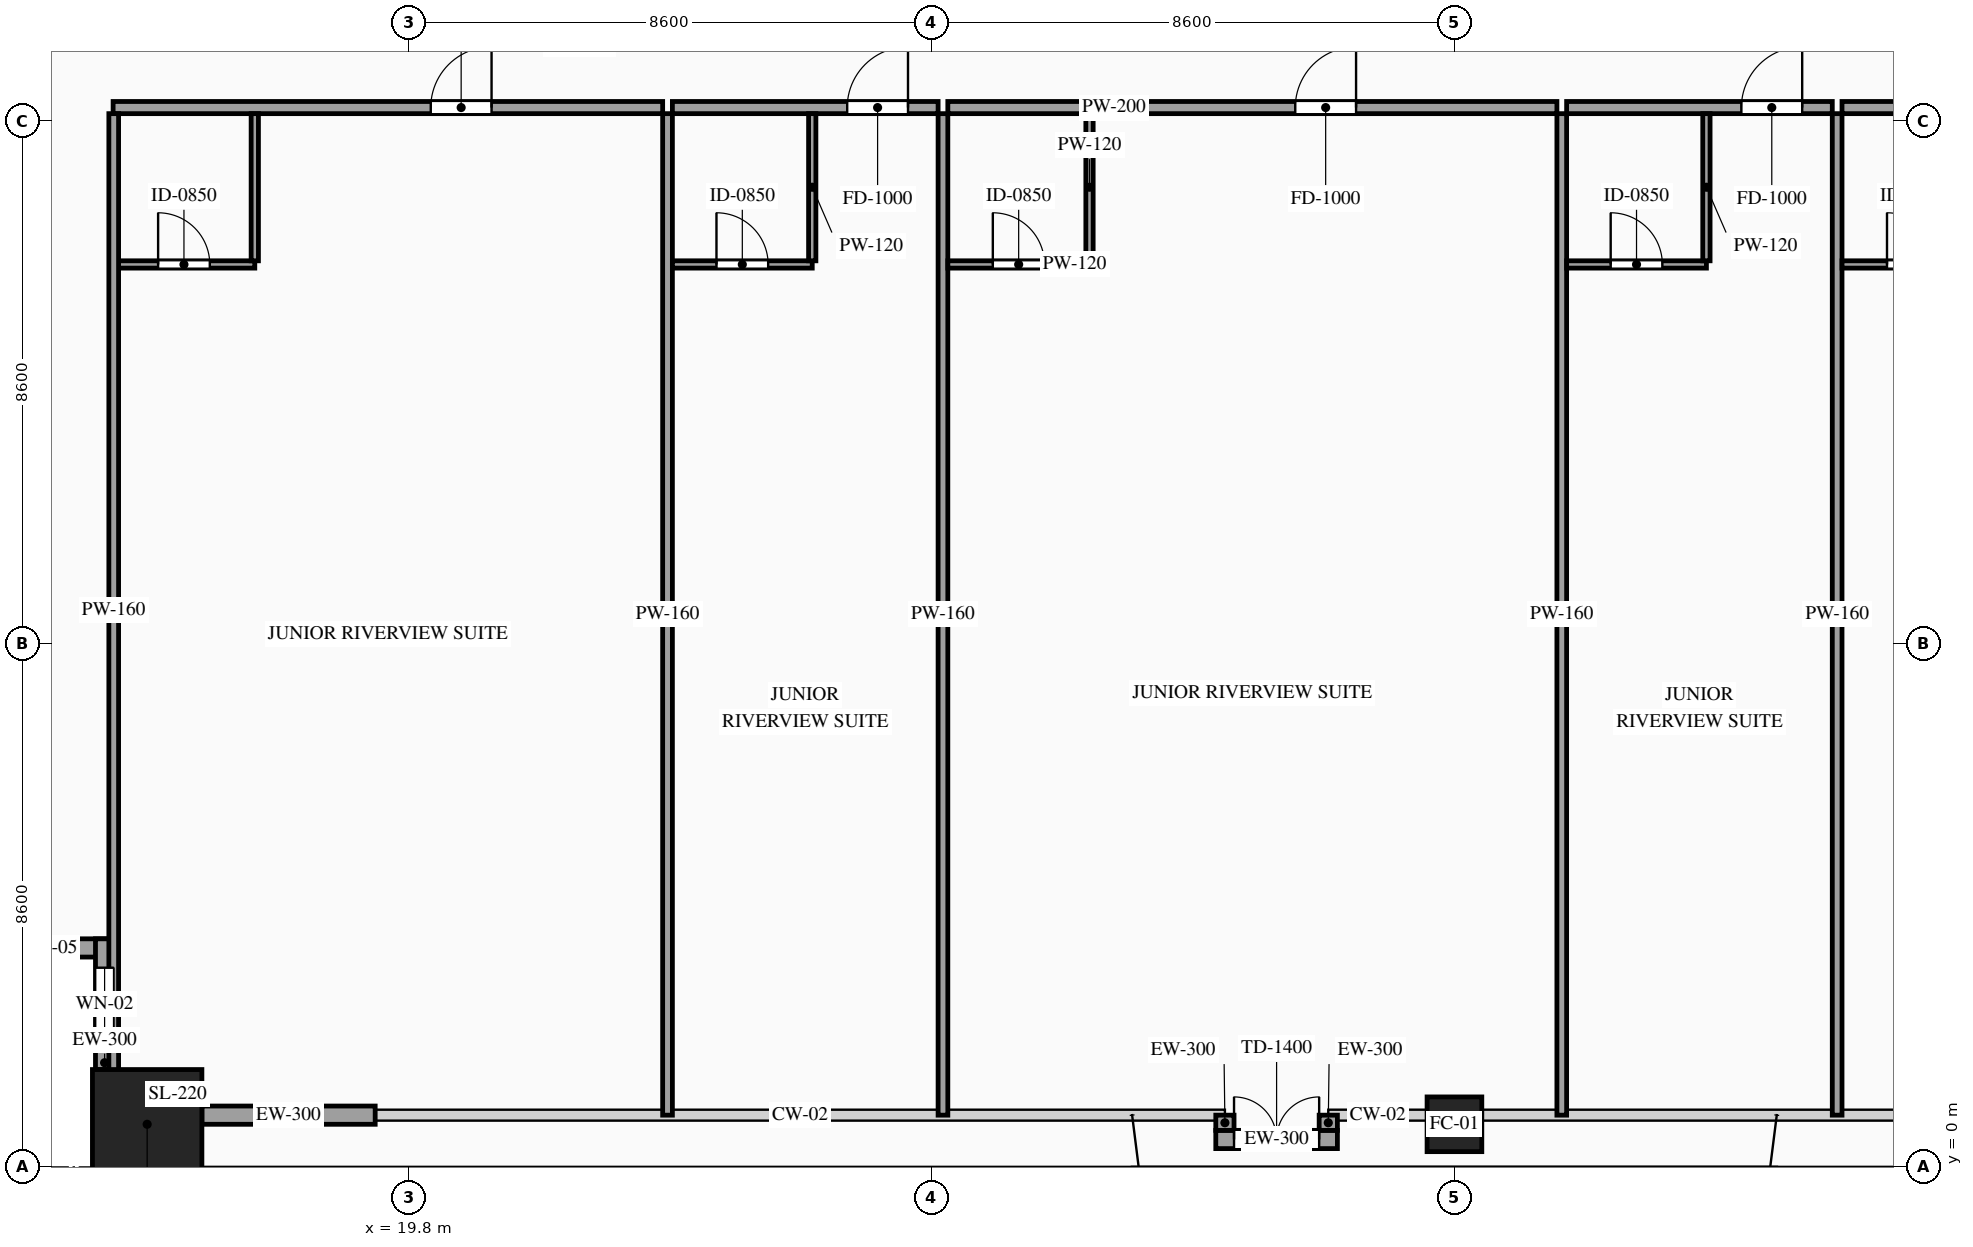
"""IFC4 building model, lengths in metres.
Left out: names, types, materials, properties, quantities, classifications, styles, units other than length and angle.
Written with IfcOpenShell. Run it as: python <this file> out.ifc"""

import sys

from ifc_helpers import new_model, si_unit, direction, frame, frame_2d, origin, origin_2d, place, context, subcontext, project, spatial, rectangle, hollow_rectangle, extrude, source, transform, mapped, element, fill, save


model = new_model("IFC4")
c1 = context("Model", 3, precision=1e-05, world=origin(), true_north=direction((0.0, 1.0)))
c2 = subcontext(c1, "Body", "Model", "MODEL_VIEW")
j1 = project(units=[si_unit("LENGTHUNIT", "METRE"), si_unit("PLANEANGLEUNIT", "RADIAN")], contexts=[c1])
p1 = place(None, origin())
s1 = spatial("IfcSite", under=j1, at=p1, CompositionType="ELEMENT")
p2 = place(p1, origin())
s2 = spatial("IfcBuilding", under=s1, at=p2, CompositionType="ELEMENT")
p3 = place(p2, frame((0.0, 0.0, 71.2)))
s3 = spatial("IfcBuildingStorey", under=s2, at=p3, CompositionType="ELEMENT", Elevation=71.2)
m1 = source(origin(), c2, "Body", "SweptSolid", [
    extrude(hollow_rectangle(XDim=1.8, YDim=1.8, WallThickness=0.08, at=origin_2d()), origin(), (0.0, 0.0, 1.0), 3.6),
])
p4 = place(p3, frame((15.5, 0.7, 0.0), z_axis=(0.0, 0.0, 1.0), x_axis=(1.0, 0.0, 0.0)))
e1 = element("IfcColumn", 1, at=p4, inside=s3, PredefinedType="COLUMN", context=c2, shape_type="MappedRepresentation", body=[
    mapped(m1, transform((0.0, 0.0, 0.0), scale=1.0)),
])
m2 = source(origin(), c2, "Body", "SweptSolid", [
    extrude(hollow_rectangle(XDim=0.9, YDim=0.9, WallThickness=0.042, at=origin_2d()), origin(), (0.0, 0.0, 1.0), 3.6),
])
p5 = place(p3, frame((37.0, 0.7, 0.0), z_axis=(0.0, 0.0, 1.0), x_axis=(1.0, 0.0, 0.0)))
e2 = element("IfcColumn", 2, at=p5, inside=s3, PredefinedType="COLUMN", context=c2, shape_type="MappedRepresentation", body=[
    mapped(m2, transform((0.0, 0.0, 0.0), scale=1.0)),
])
p6 = place(p3, frame((12.8, 3.6, 0.0), z_axis=(0.0, 0.0, 1.0), x_axis=(1.0, 0.0, 0.0)))
e3 = element("IfcWall", 3, at=p6, inside=s3, PredefinedType="SOLIDWALL", context=c2, shape_type="SweptSolid", body=[
    extrude(rectangle(XDim=2.15, YDim=0.3, at=frame_2d((1.075, 0.0))), origin(), (0.0, 0.0, 1.0), 3.38),
])
p7 = place(p6, frame((0.625, 0.0, 0.85)))
e4 = element("IfcOpeningElement", 4, at=p7, cuts=e3, PredefinedType="OPENING", context=c2, shape_type="SweptSolid", body=[
    extrude(rectangle(XDim=0.9, YDim=1.5, at=frame_2d((0.45, 0.75))), frame((0.0, 0.165, 0.0), z_axis=(0.0, -1.0, 0.0), x_axis=(1.0, 0.0, 0.0)), (0.0, 0.0, 1.0), 0.33),
])
p8 = place(p3, frame((14.8, 3.75, 0.0), z_axis=(0.0, 0.0, 1.0), x_axis=(0.0, -1.0, 0.0)))
e5 = element("IfcWall", 5, at=p8, inside=s3, PredefinedType="SOLIDWALL", context=c2, shape_type="SweptSolid", body=[
    extrude(rectangle(XDim=2.15, YDim=0.3, at=frame_2d((1.075, 0.0))), origin(), (0.0, 0.0, 1.0), 3.38),
])
p9 = place(p8, frame((0.475, 0.0, 0.85)))
e6 = element("IfcOpeningElement", 6, at=p9, cuts=e5, PredefinedType="OPENING", context=c2, shape_type="SweptSolid", body=[
    extrude(rectangle(XDim=1.2, YDim=2.1, at=frame_2d((0.6, 1.05))), frame((0.0, 0.165, 0.0), z_axis=(0.0, -1.0, 0.0), x_axis=(1.0, 0.0, 0.0)), (0.0, 0.0, 1.0), 0.33),
])
m3 = source(origin(), c2, "Body", "SweptSolid", [
    extrude(rectangle(XDim=2.85, YDim=0.3, at=frame_2d((1.425, 0.0))), origin(), (0.0, 0.0, 1.0), 2.775),
])
p10 = place(p3, frame((16.4, 0.85, 0.0), z_axis=(0.0, 0.0, 1.0), x_axis=(1.0, 0.0, 0.0)))
e7 = element("IfcWall", 7, at=p10, inside=s3, PredefinedType="SOLIDWALL", context=c2, shape_type="MappedRepresentation", body=[
    mapped(m3, transform((0.0, 0.0, 0.0), scale=1.0)),
])
p11 = place(p3, frame((33.075, 0.45, 0.0), z_axis=(0.0, 0.0, 1.0), x_axis=(1.0, 0.0, 0.0)))
e8 = element("IfcWall", 8, at=p11, inside=s3, PredefinedType="SOLIDWALL", context=c2, shape_type="SweptSolid", body=[
    extrude(rectangle(XDim=2.0, YDim=0.3, at=frame_2d((1.0, 0.0))), origin(), (0.0, 0.0, 1.0), 3.38),
])
p12 = place(p11, frame((0.3, 0.0, 0.0)))
e9 = element("IfcOpeningElement", 9, at=p12, cuts=e8, PredefinedType="OPENING", context=c2, shape_type="SweptSolid", body=[
    extrude(rectangle(XDim=1.4, YDim=2.3, at=frame_2d((0.7, 1.15))), frame((0.0, 0.165, 0.0), z_axis=(0.0, -1.0, 0.0), x_axis=(1.0, 0.0, 0.0)), (0.0, 0.0, 1.0), 0.33),
])
m4 = source(origin(), c2, "Body", "SweptSolid", [
    extrude(rectangle(XDim=0.25, YDim=0.3, at=frame_2d((0.125, 0.0))), origin(), (0.0, 0.0, 1.0), 3.38),
])
for number, where, z_axis, x_axis in (
    (10, (33.225, 0.85, 0.0), (0.0, 0.0, 1.0), (0.0, -1.0, 0.0)),
    (11, (34.925, 0.6, 0.0), (0.0, 0.0, 1.0), (0.0, 1.0, 0.0)),
):
    element("IfcWall", number, at=place(p3, frame(where, z_axis=z_axis, x_axis=x_axis)), inside=s3, PredefinedType="SOLIDWALL", context=c2, shape_type="MappedRepresentation", body=[
        mapped(m4, transform((0.0, 0.0, 0.0), scale=1.0)),
    ])
p13 = place(p3, frame((14.94, 17.42, 0.0), z_axis=(0.0, 0.0, 1.0), x_axis=(1.0, 0.0, 0.0)))
e12 = element("IfcWall", 12, at=p13, inside=s3, PredefinedType="PARTITIONING", context=c2, shape_type="SweptSolid", body=[
    extrude(rectangle(XDim=9.038, YDim=0.2, at=frame_2d((4.519, 0.0))), origin(), (0.0, 0.0, 1.0), 3.38),
])
p14 = place(p13, frame((5.224, 0.0, 0.0)))
e13 = element("IfcOpeningElement", 13, at=p14, cuts=e12, PredefinedType="OPENING", context=c2, shape_type="SweptSolid", body=[
    extrude(rectangle(XDim=1.0, YDim=2.2, at=frame_2d((0.5, 1.1))), frame((0.0, 0.115, 0.0), z_axis=(0.0, -1.0, 0.0), x_axis=(1.0, 0.0, 0.0)), (0.0, 0.0, 1.0), 0.23),
])
m5 = source(origin(), c2, "Body", "SweptSolid", [
    extrude(rectangle(XDim=16.47, YDim=0.16, at=frame_2d((8.235, 0.0))), origin(), (0.0, 0.0, 1.0), 3.38),
])
p15 = place(p3, frame((24.058, 0.85, 0.0), z_axis=(0.0, 0.0, 1.0), x_axis=(0.0, 1.0, 0.0)))
e14 = element("IfcWall", 14, at=p15, inside=s3, PredefinedType="PARTITIONING", context=c2, shape_type="MappedRepresentation", body=[
    mapped(m5, transform((0.0, 0.0, 0.0), scale=1.0)),
])
p16 = place(p3, frame((14.94, 14.84, 0.0), z_axis=(0.0, 0.0, 1.0), x_axis=(1.0, 0.0, 0.0)))
e15 = element("IfcWall", 15, at=p16, inside=s3, PredefinedType="PARTITIONING", context=c2, shape_type="SweptSolid", body=[
    extrude(rectangle(XDim=2.33, YDim=0.12, at=frame_2d((1.165, 0.0))), origin(), (0.0, 0.0, 1.0), 3.38),
])
p17 = place(p16, frame((0.74, 0.0, 0.0)))
e16 = element("IfcOpeningElement", 16, at=p17, cuts=e15, PredefinedType="OPENING", context=c2, shape_type="SweptSolid", body=[
    extrude(rectangle(XDim=0.85, YDim=2.1, at=frame_2d((0.425, 1.05))), frame((0.0, 0.075, 0.0), z_axis=(0.0, -1.0, 0.0), x_axis=(1.0, 0.0, 0.0)), (0.0, 0.0, 1.0), 0.15),
])
m6 = source(origin(), c2, "Body", "SweptSolid", [
    extrude(rectangle(XDim=2.42, YDim=0.12, at=frame_2d((1.21, 0.0))), origin(), (0.0, 0.0, 1.0), 3.38),
])
p18 = place(p3, frame((17.27, 14.9, 0.0), z_axis=(0.0, 0.0, 1.0), x_axis=(0.0, 1.0, 0.0)))
e17 = element("IfcWall", 17, at=p18, inside=s3, PredefinedType="PARTITIONING", context=c2, shape_type="MappedRepresentation", body=[
    mapped(m6, transform((0.0, 0.0, 0.0), scale=1.0)),
])
p19 = place(p3, frame((24.138, 17.42, 0.0), z_axis=(0.0, 0.0, 1.0), x_axis=(1.0, 0.0, 0.0)))
e18 = element("IfcWall", 18, at=p19, inside=s3, PredefinedType="PARTITIONING", context=c2, shape_type="SweptSolid", body=[
    extrude(rectangle(XDim=4.37, YDim=0.2, at=frame_2d((2.185, 0.0))), origin(), (0.0, 0.0, 1.0), 3.38),
])
p20 = place(p19, frame((2.875, 0.0, 0.0)))
e19 = element("IfcOpeningElement", 19, at=p20, cuts=e18, PredefinedType="OPENING", context=c2, shape_type="SweptSolid", body=[
    extrude(rectangle(XDim=1.0, YDim=2.2, at=frame_2d((0.5, 1.1))), frame((0.0, 0.115, 0.0), z_axis=(0.0, -1.0, 0.0), x_axis=(1.0, 0.0, 0.0)), (0.0, 0.0, 1.0), 0.23),
])
p21 = place(p3, frame((28.588, 0.85, 0.0), z_axis=(0.0, 0.0, 1.0), x_axis=(0.0, 1.0, 0.0)))
e20 = element("IfcWall", 20, at=p21, inside=s3, PredefinedType="PARTITIONING", context=c2, shape_type="MappedRepresentation", body=[
    mapped(m5, transform((0.0, 0.0, 0.0), scale=1.0)),
])
p22 = place(p3, frame((24.138, 14.84, 0.0), z_axis=(0.0, 0.0, 1.0), x_axis=(1.0, 0.0, 0.0)))
e21 = element("IfcWall", 21, at=p22, inside=s3, PredefinedType="PARTITIONING", context=c2, shape_type="SweptSolid", body=[
    extrude(rectangle(XDim=2.3, YDim=0.12, at=frame_2d((1.15, 0.0))), origin(), (0.0, 0.0, 1.0), 3.38),
])
p23 = place(p22, frame((0.725, 0.0, 0.0)))
e22 = element("IfcOpeningElement", 22, at=p23, cuts=e21, PredefinedType="OPENING", context=c2, shape_type="SweptSolid", body=[
    extrude(rectangle(XDim=0.85, YDim=2.1, at=frame_2d((0.425, 1.05))), frame((0.0, 0.075, 0.0), z_axis=(0.0, -1.0, 0.0), x_axis=(1.0, 0.0, 0.0)), (0.0, 0.0, 1.0), 0.15),
])
p24 = place(p3, frame((26.438, 14.9, 0.0), z_axis=(0.0, 0.0, 1.0), x_axis=(0.0, 1.0, 0.0)))
e23 = element("IfcWall", 23, at=p24, inside=s3, PredefinedType="PARTITIONING", context=c2, shape_type="MappedRepresentation", body=[
    mapped(m6, transform((0.0, 0.0, 0.0), scale=1.0)),
])
p25 = place(p3, frame((28.668, 17.42, 0.0), z_axis=(0.0, 0.0, 1.0), x_axis=(1.0, 0.0, 0.0)))
e24 = element("IfcWall", 24, at=p25, inside=s3, PredefinedType="PARTITIONING", context=c2, shape_type="SweptSolid", body=[
    extrude(rectangle(XDim=10.017, YDim=0.2, at=frame_2d((5.009, 0.0))), origin(), (0.0, 0.0, 1.0), 3.38),
])
p26 = place(p25, frame((5.714, 0.0, 0.0)))
e25 = element("IfcOpeningElement", 25, at=p26, cuts=e24, PredefinedType="OPENING", context=c2, shape_type="SweptSolid", body=[
    extrude(rectangle(XDim=1.0, YDim=2.2, at=frame_2d((0.5, 1.1))), frame((0.0, 0.115, 0.0), z_axis=(0.0, -1.0, 0.0), x_axis=(1.0, 0.0, 0.0)), (0.0, 0.0, 1.0), 0.23),
])
p27 = place(p3, frame((38.765, 0.85, 0.0), z_axis=(0.0, 0.0, 1.0), x_axis=(0.0, 1.0, 0.0)))
e26 = element("IfcWall", 26, at=p27, inside=s3, PredefinedType="PARTITIONING", context=c2, shape_type="MappedRepresentation", body=[
    mapped(m5, transform((0.0, 0.0, 0.0), scale=1.0)),
])
p28 = place(p3, frame((28.668, 14.84, 0.0), z_axis=(0.0, 0.0, 1.0), x_axis=(1.0, 0.0, 0.0)))
e27 = element("IfcWall", 27, at=p28, inside=s3, PredefinedType="PARTITIONING", context=c2, shape_type="SweptSolid", body=[
    extrude(rectangle(XDim=2.33, YDim=0.12, at=frame_2d((1.165, 0.0))), origin(), (0.0, 0.0, 1.0), 3.38),
])
p29 = place(p28, frame((0.74, 0.0, 0.0)))
e28 = element("IfcOpeningElement", 28, at=p29, cuts=e27, PredefinedType="OPENING", context=c2, shape_type="SweptSolid", body=[
    extrude(rectangle(XDim=0.85, YDim=2.1, at=frame_2d((0.425, 1.05))), frame((0.0, 0.075, 0.0), z_axis=(0.0, -1.0, 0.0), x_axis=(1.0, 0.0, 0.0)), (0.0, 0.0, 1.0), 0.15),
])
p30 = place(p3, frame((30.998, 14.9, 0.0), z_axis=(0.0, 0.0, 1.0), x_axis=(0.0, 1.0, 0.0)))
e29 = element("IfcWall", 29, at=p30, inside=s3, PredefinedType="PARTITIONING", context=c2, shape_type="MappedRepresentation", body=[
    mapped(m6, transform((0.0, 0.0, 0.0), scale=1.0)),
])
p31 = place(p3, frame((38.845, 17.42, 0.0), z_axis=(0.0, 0.0, 1.0), x_axis=(1.0, 0.0, 0.0)))
e30 = element("IfcWall", 30, at=p31, inside=s3, PredefinedType="PARTITIONING", context=c2, shape_type="SweptSolid", body=[
    extrude(rectangle(XDim=4.369, YDim=0.2, at=frame_2d((2.185, 0.0))), origin(), (0.0, 0.0, 1.0), 3.38),
])
p32 = place(p31, frame((2.874, 0.0, 0.0)))
e31 = element("IfcOpeningElement", 31, at=p32, cuts=e30, PredefinedType="OPENING", context=c2, shape_type="SweptSolid", body=[
    extrude(rectangle(XDim=1.0, YDim=2.2, at=frame_2d((0.5, 1.1))), frame((0.0, 0.115, 0.0), z_axis=(0.0, -1.0, 0.0), x_axis=(1.0, 0.0, 0.0)), (0.0, 0.0, 1.0), 0.23),
])
p33 = place(p3, frame((43.294, 0.85, 0.0), z_axis=(0.0, 0.0, 1.0), x_axis=(0.0, 1.0, 0.0)))
e32 = element("IfcWall", 32, at=p33, inside=s3, PredefinedType="PARTITIONING", context=c2, shape_type="MappedRepresentation", body=[
    mapped(m5, transform((0.0, 0.0, 0.0), scale=1.0)),
])
p34 = place(p3, frame((38.845, 14.84, 0.0), z_axis=(0.0, 0.0, 1.0), x_axis=(1.0, 0.0, 0.0)))
e33 = element("IfcWall", 33, at=p34, inside=s3, PredefinedType="PARTITIONING", context=c2, shape_type="SweptSolid", body=[
    extrude(rectangle(XDim=2.299, YDim=0.12, at=frame_2d((1.149, 0.0))), origin(), (0.0, 0.0, 1.0), 3.38),
])
p35 = place(p34, frame((0.725, 0.0, 0.0)))
e34 = element("IfcOpeningElement", 34, at=p35, cuts=e33, PredefinedType="OPENING", context=c2, shape_type="SweptSolid", body=[
    extrude(rectangle(XDim=0.85, YDim=2.1, at=frame_2d((0.425, 1.05))), frame((0.0, 0.075, 0.0), z_axis=(0.0, -1.0, 0.0), x_axis=(1.0, 0.0, 0.0)), (0.0, 0.0, 1.0), 0.15),
])
p36 = place(p3, frame((41.144, 14.9, 0.0), z_axis=(0.0, 0.0, 1.0), x_axis=(0.0, 1.0, 0.0)))
e35 = element("IfcWall", 35, at=p36, inside=s3, PredefinedType="PARTITIONING", context=c2, shape_type="MappedRepresentation", body=[
    mapped(m6, transform((0.0, 0.0, 0.0), scale=1.0)),
])
p37 = place(p3, frame((43.374, 17.42, 0.0), z_axis=(0.0, 0.0, 1.0), x_axis=(1.0, 0.0, 0.0)))
e36 = element("IfcWall", 36, at=p37, inside=s3, PredefinedType="PARTITIONING", context=c2, shape_type="SweptSolid", body=[
    extrude(rectangle(XDim=9.429, YDim=0.2, at=frame_2d((4.714, 0.0))), origin(), (0.0, 0.0, 1.0), 3.38),
])
p38 = place(p37, frame((5.419, 0.0, 0.0)))
e37 = element("IfcOpeningElement", 37, at=p38, cuts=e36, PredefinedType="OPENING", context=c2, shape_type="SweptSolid", body=[
    extrude(rectangle(XDim=1.0, YDim=2.2, at=frame_2d((0.5, 1.1))), frame((0.0, 0.115, 0.0), z_axis=(0.0, -1.0, 0.0), x_axis=(1.0, 0.0, 0.0)), (0.0, 0.0, 1.0), 0.23),
])
p39 = place(p3, frame((43.374, 14.84, 0.0), z_axis=(0.0, 0.0, 1.0), x_axis=(1.0, 0.0, 0.0)))
e38 = element("IfcWall", 38, at=p39, inside=s3, PredefinedType="PARTITIONING", context=c2, shape_type="SweptSolid", body=[
    extrude(rectangle(XDim=2.33, YDim=0.12, at=frame_2d((1.165, 0.0))), origin(), (0.0, 0.0, 1.0), 3.38),
])
p40 = place(p39, frame((0.74, 0.0, 0.0)))
e39 = element("IfcOpeningElement", 39, at=p40, cuts=e38, PredefinedType="OPENING", context=c2, shape_type="SweptSolid", body=[
    extrude(rectangle(XDim=0.85, YDim=2.1, at=frame_2d((0.425, 1.05))), frame((0.0, 0.075, 0.0), z_axis=(0.0, -1.0, 0.0), x_axis=(1.0, 0.0, 0.0)), (0.0, 0.0, 1.0), 0.15),
])
m7 = source(origin(), c2, "Body", "SweptSolid", [
    extrude(rectangle(XDim=16.32, YDim=0.16, at=frame_2d((8.16, 0.0))), origin(), (0.0, 0.0, 1.0), 3.38),
])
p41 = place(p3, frame((14.95, 1.0, 0.0), z_axis=(0.0, 0.0, 1.0), x_axis=(0.0, 1.0, 0.0)))
e40 = element("IfcWall", 40, at=p41, inside=s3, PredefinedType="PARTITIONING", context=c2, shape_type="MappedRepresentation", body=[
    mapped(m7, transform((0.0, 0.0, 0.0), scale=1.0)),
])
m8 = source(origin(), c2, "Body", "SweptSolid", [
    extrude(rectangle(XDim=0.9, YDim=1.5, at=frame_2d((0.45, 0.75))), frame((0.0, 0.03, 0.0), z_axis=(0.0, -1.0, 0.0), x_axis=(1.0, 0.0, 0.0)), (0.0, 0.0, 1.0), 0.06),
])
p42 = place(p7, origin())
e41 = element("IfcWindow", 41, at=p42, inside=s3, PartitioningType="SINGLE_PANEL", PredefinedType="WINDOW", context=c2, shape_type="MappedRepresentation", body=[
    mapped(m8, transform((0.0, 0.0, 0.0), scale=1.0)),
])
fill(e4, e41)
m9 = source(origin(), c2, "Body", "SweptSolid", [
    extrude(rectangle(XDim=1.2, YDim=2.1, at=frame_2d((0.6, 1.05))), frame((0.0, 0.03, 0.0), z_axis=(0.0, -1.0, 0.0), x_axis=(1.0, 0.0, 0.0)), (0.0, 0.0, 1.0), 0.06),
])
p43 = place(p9, origin())
e42 = element("IfcWindow", 42, at=p43, inside=s3, PartitioningType="SINGLE_PANEL", PredefinedType="WINDOW", context=c2, shape_type="MappedRepresentation", body=[
    mapped(m9, transform((0.0, 0.0, 0.0), scale=1.0)),
])
fill(e6, e42)
m10 = source(origin(), c2, "Body", "SweptSolid", [
    extrude(rectangle(XDim=1.4, YDim=2.3, at=frame_2d((0.7, 1.15))), frame((0.0, 0.025, 0.0), z_axis=(0.0, -1.0, 0.0), x_axis=(1.0, 0.0, 0.0)), (0.0, 0.0, 1.0), 0.05),
])
p44 = place(p12, origin())
e43 = element("IfcDoor", 43, at=p44, inside=s3, OperationType="DOUBLE_DOOR_SINGLE_SWING", PredefinedType="DOOR", context=c2, shape_type="MappedRepresentation", body=[
    mapped(m10, transform((0.0, 0.0, 0.0), scale=1.0)),
])
fill(e9, e43)
m11 = source(origin(), c2, "Body", "SweptSolid", [
    extrude(rectangle(XDim=1.0, YDim=2.2, at=frame_2d((0.5, 1.1))), frame((0.0, 0.025, 0.0), z_axis=(0.0, -1.0, 0.0), x_axis=(1.0, 0.0, 0.0)), (0.0, 0.0, 1.0), 0.05),
])
p45 = place(p14, origin())
e44 = element("IfcDoor", 44, at=p45, inside=s3, OperationType="SINGLE_SWING_RIGHT", PredefinedType="DOOR", context=c2, shape_type="MappedRepresentation", body=[
    mapped(m11, transform((0.0, 0.0, 0.0), scale=1.0)),
])
fill(e13, e44)
m12 = source(origin(), c2, "Body", "SweptSolid", [
    extrude(rectangle(XDim=0.85, YDim=2.1, at=frame_2d((0.425, 1.05))), frame((0.0, 0.025, 0.0), z_axis=(0.0, -1.0, 0.0), x_axis=(1.0, 0.0, 0.0)), (0.0, 0.0, 1.0), 0.05),
])
p46 = place(p17, origin())
e45 = element("IfcDoor", 45, at=p46, inside=s3, OperationType="SINGLE_SWING_LEFT", PredefinedType="DOOR", context=c2, shape_type="MappedRepresentation", body=[
    mapped(m12, transform((0.0, 0.0, 0.0), scale=1.0)),
])
fill(e16, e45)
p47 = place(p20, origin())
e46 = element("IfcDoor", 46, at=p47, inside=s3, OperationType="SINGLE_SWING_RIGHT", PredefinedType="DOOR", context=c2, shape_type="MappedRepresentation", body=[
    mapped(m11, transform((0.0, 0.0, 0.0), scale=1.0)),
])
fill(e19, e46)
p48 = place(p23, origin())
e47 = element("IfcDoor", 47, at=p48, inside=s3, OperationType="SINGLE_SWING_LEFT", PredefinedType="DOOR", context=c2, shape_type="MappedRepresentation", body=[
    mapped(m12, transform((0.0, 0.0, 0.0), scale=1.0)),
])
fill(e22, e47)
p49 = place(p26, origin())
e48 = element("IfcDoor", 48, at=p49, inside=s3, OperationType="SINGLE_SWING_RIGHT", PredefinedType="DOOR", context=c2, shape_type="MappedRepresentation", body=[
    mapped(m11, transform((0.0, 0.0, 0.0), scale=1.0)),
])
fill(e25, e48)
p50 = place(p29, origin())
e49 = element("IfcDoor", 49, at=p50, inside=s3, OperationType="SINGLE_SWING_LEFT", PredefinedType="DOOR", context=c2, shape_type="MappedRepresentation", body=[
    mapped(m12, transform((0.0, 0.0, 0.0), scale=1.0)),
])
fill(e28, e49)
p51 = place(p32, origin())
e50 = element("IfcDoor", 50, at=p51, inside=s3, OperationType="SINGLE_SWING_RIGHT", PredefinedType="DOOR", context=c2, shape_type="MappedRepresentation", body=[
    mapped(m11, transform((0.0, 0.0, 0.0), scale=1.0)),
])
fill(e31, e50)
p52 = place(p35, origin())
e51 = element("IfcDoor", 51, at=p52, inside=s3, OperationType="SINGLE_SWING_LEFT", PredefinedType="DOOR", context=c2, shape_type="MappedRepresentation", body=[
    mapped(m12, transform((0.0, 0.0, 0.0), scale=1.0)),
])
fill(e34, e51)
p53 = place(p40, origin())
e52 = element("IfcDoor", 52, at=p53, inside=s3, OperationType="SINGLE_SWING_LEFT", PredefinedType="DOOR", context=c2, shape_type="MappedRepresentation", body=[
    mapped(m12, transform((0.0, 0.0, 0.0), scale=1.0)),
])
fill(e39, e52)
save(model, sys.argv[1])
